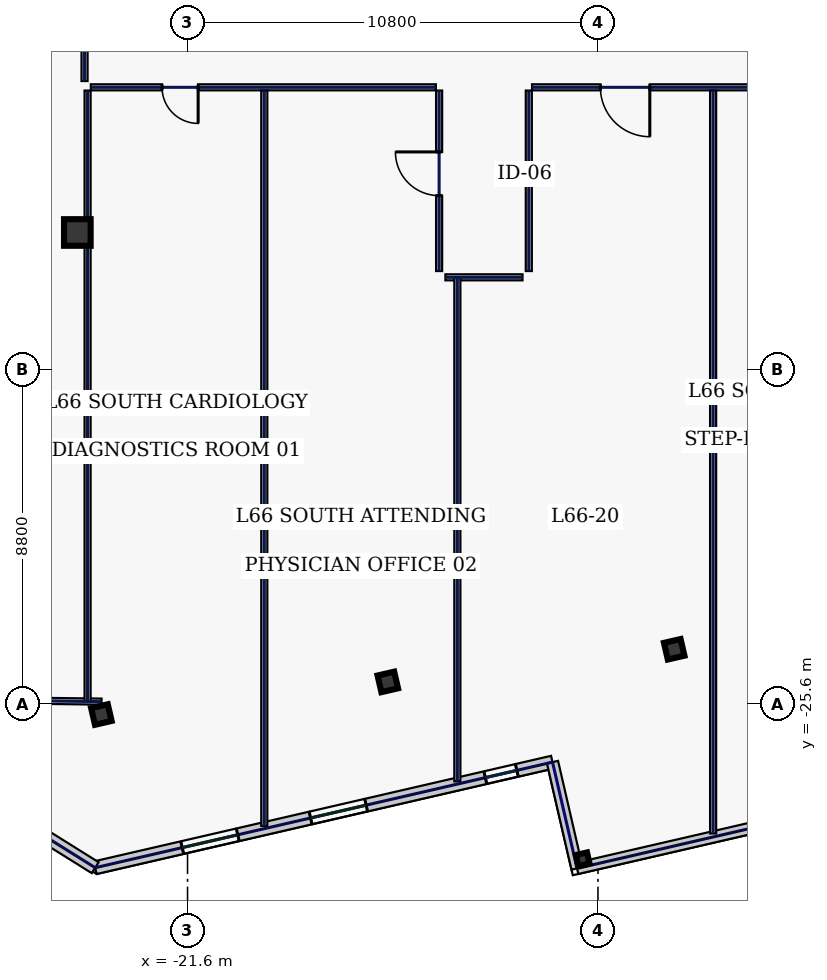
"""IFC4 building model, lengths in metres.
Left out: names, types, materials, properties, quantities, classifications, styles, units other than length and angle.
Written with IfcOpenShell. Run it as: python <this file> out.ifc"""

import sys

from ifc_helpers import new_model, si_unit, direction, frame, frame_2d, origin, origin_2d, place, context, subcontext, project, spatial, rectangle, hollow_rectangle, extrude, element, fill, save


model = new_model("IFC4")
c1 = context("Model", 3, precision=1e-05, world=origin(), true_north=direction((0.0, 1.0)))
c2 = subcontext(c1, "Body", "Model", "MODEL_VIEW")
j1 = project(units=[si_unit("LENGTHUNIT", "METRE"), si_unit("PLANEANGLEUNIT", "RADIAN")], contexts=[c1])
p1 = place(None, origin())
s1 = spatial("IfcSite", under=j1, at=p1, CompositionType="ELEMENT")
p2 = place(p1, origin())
s2 = spatial("IfcBuilding", under=s1, at=p2, CompositionType="ELEMENT")
p3 = place(p2, frame((0.0, 0.0, 285.0)))
s3 = spatial("IfcBuildingStorey", under=s2, at=p3, CompositionType="ELEMENT", Elevation=285.0)
p4 = place(p3, frame((-24.5, -13.2, 0.0), z_axis=(0.0, 0.0, 1.0), x_axis=(1.0, 0.0, 0.0)))
e1 = element("IfcColumn", 1, at=p4, inside=s3, PredefinedType="COLUMN", context=c2, shape_type="SweptSolid", body=[
    extrude(hollow_rectangle(XDim=0.7, YDim=0.7, WallThickness=0.032, at=origin_2d()), origin(), (0.0, 0.0, 1.0), 3.74),
])
for number, where, z_axis, x_axis in (
    (2, (-23.867, -25.886, 0.0), (0.0, 0.0, 1.0), (0.974, 0.225, 0.0)),
    (3, (-16.33, -25.027, 0.0), (0.0, 0.0, 1.0), (0.974, 0.225, 0.0)),
    (4, (-8.794, -24.168, 0.0), (0.0, 0.0, 1.0), (0.974, 0.225, 0.0)),
):
    element("IfcColumn", number, at=place(p3, frame(where, z_axis=z_axis, x_axis=x_axis)), inside=s3, PredefinedType="COLUMN", context=c2, shape_type="SweptSolid", body=[
        extrude(hollow_rectangle(XDim=0.45, YDim=0.45, WallThickness=0.022, at=origin_2d()), origin(), (0.0, 0.0, 1.0), 3.74),
    ])
p5 = place(p3, frame((-11.201, -29.695, 0.0), z_axis=(0.0, 0.0, 1.0), x_axis=(0.974370064785, 0.224951054344, 0.0)))
e5 = element("IfcColumn", 5, at=p5, inside=s3, PredefinedType="COLUMN", context=c2, shape_type="SweptSolid", body=[
    extrude(hollow_rectangle(XDim=0.3, YDim=0.3, WallThickness=0.016, at=origin_2d()), origin(), (0.0, 0.0, 1.0), 3.74),
])
p6 = place(p3, frame((-24.03, -29.916, 0.0), z_axis=(0.0, 0.0, 1.0), x_axis=(0.974371201193, 0.224946131964, 0.0)))
e6 = element("IfcWall", 6, at=p6, inside=s3, PredefinedType="STANDARD", context=c2, shape_type="SweptSolid", body=[
    extrude(rectangle(XDim=12.35, YDim=0.34, at=frame_2d((6.175, 0.0))), origin(), (0.0, 0.0, 1.0), 3.74),
])
p7 = place(p6, frame((2.35, 0.0, 0.9)))
e7 = element("IfcOpeningElement", 7, at=p7, cuts=e6, PredefinedType="OPENING", context=c2, shape_type="SweptSolid", body=[
    extrude(rectangle(XDim=1.5, YDim=2.0, at=frame_2d((0.75, 1.0))), frame((0.0, 0.18, 0.0), z_axis=(0.0, -1.0, 0.0), x_axis=(1.0, 0.0, 0.0)), (0.0, 0.0, 1.0), 0.36),
])
p8 = place(p6, frame((5.817, 0.0, 0.9)))
e8 = element("IfcOpeningElement", 8, at=p8, cuts=e6, PredefinedType="OPENING", context=c2, shape_type="SweptSolid", body=[
    extrude(rectangle(XDim=1.5, YDim=2.0, at=frame_2d((0.75, 1.0))), frame((0.0, 0.18, 0.0), z_axis=(0.0, -1.0, 0.0), x_axis=(1.0, 0.0, 0.0)), (0.0, 0.0, 1.0), 0.36),
])
p9 = place(p6, frame((10.537, 0.0, 0.9)))
e9 = element("IfcOpeningElement", 9, at=p9, cuts=e6, PredefinedType="OPENING", context=c2, shape_type="SweptSolid", body=[
    extrude(rectangle(XDim=0.85, YDim=1.85, at=frame_2d((0.425, 0.925))), frame((0.0, 0.18, 0.0), z_axis=(0.0, -1.0, 0.0), x_axis=(1.0, 0.0, 0.0)), (0.0, 0.0, 1.0), 0.36),
])
p10 = place(p3, frame((-29.343, -26.596, 0.0), z_axis=(0.0, 0.0, 1.0), x_axis=(0.848037708252, -0.529935887993, 0.0)))
e10 = element("IfcWall", 10, at=p10, inside=s3, PredefinedType="STANDARD", context=c2, shape_type="SweptSolid", body=[
    extrude(rectangle(XDim=6.265, YDim=0.34, at=frame_2d((3.133, 0.0))), origin(), (0.0, 0.0, 1.0), 3.74),
])
p11 = place(p3, frame((-11.996, -27.138, 0.0), z_axis=(0.0, 0.0, 1.0), x_axis=(0.224921635065, -0.974376856293, 0.0)))
e11 = element("IfcWall", 11, at=p11, inside=s3, PredefinedType="STANDARD", context=c2, shape_type="SweptSolid", body=[
    extrude(rectangle(XDim=2.87, YDim=0.3, at=frame_2d((1.435, 0.0))), origin(), (0.0, 0.0, 1.0), 3.74),
])
p12 = place(p3, frame((-11.351, -29.935, 0.0), z_axis=(0.0, 0.0, 1.0), x_axis=(0.974366807022, 0.224965164799, 0.0)))
e12 = element("IfcWall", 12, at=p12, inside=s3, PredefinedType="STANDARD", context=c2, shape_type="SweptSolid", body=[
    extrude(rectangle(XDim=8.1, YDim=0.3, at=frame_2d((4.05, 0.0))), origin(), (0.0, 0.0, 1.0), 3.385),
])
p13 = place(p3, frame((-28.994, -25.479, 0.0), z_axis=(0.0, 0.0, 1.0), x_axis=(0.999915052546, -0.01303409726, 0.0)))
e13 = element("IfcWall", 13, at=p13, inside=s3, PredefinedType="PARTITIONING", context=c2, shape_type="SweptSolid", body=[
    extrude(rectangle(XDim=5.132, YDim=0.16, at=frame_2d((2.566, 0.0))), origin(), (0.0, 0.0, 1.0), 3.74),
])
p14 = place(p3, frame((-24.31, -9.215, 0.0), z_axis=(0.0, 0.0, 1.0), x_axis=(0.0, 1.0, 0.0)))
e14 = element("IfcWall", 14, at=p14, inside=s3, PredefinedType="PARTITIONING", context=c2, shape_type="SweptSolid", body=[
    extrude(rectangle(XDim=18.63, YDim=0.16, at=frame_2d((9.315, 0.0))), origin(), (0.0, 0.0, 1.0), 3.74),
])
p15 = place(p14, frame((1.769, 0.0, 0.0)))
e15 = element("IfcOpeningElement", 15, at=p15, cuts=e14, PredefinedType="OPENING", context=c2, shape_type="SweptSolid", body=[
    extrude(rectangle(XDim=0.95, YDim=2.2, at=frame_2d((0.475, 1.1))), frame((0.0, 0.09, 0.0), z_axis=(0.0, -1.0, 0.0), x_axis=(1.0, 0.0, 0.0)), (0.0, 0.0, 1.0), 0.18),
])
p16 = place(p14, frame((5.6, 0.0, 0.0)))
e16 = element("IfcOpeningElement", 16, at=p16, cuts=e14, PredefinedType="OPENING", context=c2, shape_type="SweptSolid", body=[
    extrude(rectangle(XDim=0.95, YDim=2.2, at=frame_2d((0.475, 1.1))), frame((0.0, 0.09, 0.0), z_axis=(0.0, -1.0, 0.0), x_axis=(1.0, 0.0, 0.0)), (0.0, 0.0, 1.0), 0.18),
])
p17 = place(p14, frame((10.8, 0.0, 0.0)))
e17 = element("IfcOpeningElement", 17, at=p17, cuts=e14, PredefinedType="OPENING", context=c2, shape_type="SweptSolid", body=[
    extrude(rectangle(XDim=0.95, YDim=2.2, at=frame_2d((0.475, 1.1))), frame((0.0, 0.09, 0.0), z_axis=(0.0, -1.0, 0.0), x_axis=(1.0, 0.0, 0.0)), (0.0, 0.0, 1.0), 0.18),
])
p18 = place(p14, frame((15.981, 0.0, 0.0)))
e18 = element("IfcOpeningElement", 18, at=p18, cuts=e14, PredefinedType="OPENING", context=c2, shape_type="SweptSolid", body=[
    extrude(rectangle(XDim=0.95, YDim=2.2, at=frame_2d((0.475, 1.1))), frame((0.0, 0.09, 0.0), z_axis=(0.0, -1.0, 0.0), x_axis=(1.0, 0.0, 0.0)), (0.0, 0.0, 1.0), 0.18),
])
p19 = place(p3, frame((24.145, -9.38, 0.0), z_axis=(0.0, 0.0, 1.0), x_axis=(-1.0, 0.0, 0.0)))
e19 = element("IfcWall", 19, at=p19, inside=s3, PredefinedType="PARTITIONING", context=c2, shape_type="SweptSolid", body=[
    extrude(rectangle(XDim=36.68, YDim=0.16, at=frame_2d((18.34, 0.0))), origin(), (0.0, 0.0, 1.0), 3.74),
])
p20 = place(p19, frame((33.581, 0.0, 0.0)))
e20 = element("IfcOpeningElement", 20, at=p20, cuts=e19, PredefinedType="OPENING", context=c2, shape_type="SweptSolid", body=[
    extrude(rectangle(XDim=1.3, YDim=2.2, at=frame_2d((0.65, 1.1))), frame((0.0, 0.09, 0.0), z_axis=(0.0, -1.0, 0.0), x_axis=(1.0, 0.0, 0.0)), (0.0, 0.0, 1.0), 0.18),
])
p21 = place(p19, frame((28.946, 0.0, 0.0)))
e21 = element("IfcOpeningElement", 21, at=p21, cuts=e19, PredefinedType="OPENING", context=c2, shape_type="SweptSolid", body=[
    extrude(rectangle(XDim=1.3, YDim=2.2, at=frame_2d((0.65, 1.1))), frame((0.0, 0.09, 0.0), z_axis=(0.0, -1.0, 0.0), x_axis=(1.0, 0.0, 0.0)), (0.0, 0.0, 1.0), 0.18),
])
p22 = place(p19, frame((24.736, 0.0, 0.0)))
e22 = element("IfcOpeningElement", 22, at=p22, cuts=e19, PredefinedType="OPENING", context=c2, shape_type="SweptSolid", body=[
    extrude(rectangle(XDim=0.95, YDim=2.2, at=frame_2d((0.475, 1.1))), frame((0.0, 0.09, 0.0), z_axis=(0.0, -1.0, 0.0), x_axis=(1.0, 0.0, 0.0)), (0.0, 0.0, 1.0), 0.18),
])
p23 = place(p19, frame((18.455, 0.0, 0.0)))
e23 = element("IfcOpeningElement", 23, at=p23, cuts=e19, PredefinedType="OPENING", context=c2, shape_type="SweptSolid", body=[
    extrude(rectangle(XDim=0.95, YDim=2.2, at=frame_2d((0.475, 1.1))), frame((0.0, 0.09, 0.0), z_axis=(0.0, -1.0, 0.0), x_axis=(1.0, 0.0, 0.0)), (0.0, 0.0, 1.0), 0.18),
])
p24 = place(p19, frame((9.905, 0.0, 0.0)))
e24 = element("IfcOpeningElement", 24, at=p24, cuts=e19, PredefinedType="OPENING", context=c2, shape_type="SweptSolid", body=[
    extrude(rectangle(XDim=0.95, YDim=2.2, at=frame_2d((0.475, 1.1))), frame((0.0, 0.09, 0.0), z_axis=(0.0, -1.0, 0.0), x_axis=(1.0, 0.0, 0.0)), (0.0, 0.0, 1.0), 0.18),
])
p25 = place(p19, frame((2.784, 0.0, 0.0)))
e25 = element("IfcOpeningElement", 25, at=p25, cuts=e19, PredefinedType="OPENING", context=c2, shape_type="SweptSolid", body=[
    extrude(rectangle(XDim=1.05, YDim=2.2, at=frame_2d((0.525, 1.1))), frame((0.0, 0.09, 0.0), z_axis=(0.0, -1.0, 0.0), x_axis=(1.0, 0.0, 0.0)), (0.0, 0.0, 1.0), 0.18),
])
p26 = place(p3, frame((-12.62, -9.465, 0.0), z_axis=(0.0, 0.0, 1.0), x_axis=(0.0, -1.0, 0.0)))
e26 = element("IfcWall", 26, at=p26, inside=s3, PredefinedType="PARTITIONING", context=c2, shape_type="SweptSolid", body=[
    extrude(rectangle(XDim=4.75, YDim=0.16, at=frame_2d((2.375, 0.0))), origin(), (0.0, 0.0, 1.0), 3.74),
])
p27 = place(p3, frame((-12.785, -14.38, 0.0), z_axis=(0.0, 0.0, 1.0), x_axis=(-1.0, 0.0, 0.0)))
e27 = element("IfcWall", 27, at=p27, inside=s3, PredefinedType="PARTITIONING", context=c2, shape_type="SweptSolid", body=[
    extrude(rectangle(XDim=2.03, YDim=0.16, at=frame_2d((1.015, 0.0))), origin(), (0.0, 0.0, 1.0), 3.74),
])
p28 = place(p3, frame((-14.98, -14.215, 0.0), z_axis=(0.0, 0.0, 1.0), x_axis=(0.0, 1.0, 0.0)))
e28 = element("IfcWall", 28, at=p28, inside=s3, PredefinedType="PARTITIONING", context=c2, shape_type="SweptSolid", body=[
    extrude(rectangle(XDim=4.75, YDim=0.16, at=frame_2d((2.375, 0.0))), origin(), (0.0, 0.0, 1.0), 3.74),
])
p29 = place(p28, frame((1.985, 0.0, 0.0)))
e29 = element("IfcOpeningElement", 29, at=p29, cuts=e28, PredefinedType="OPENING", context=c2, shape_type="SweptSolid", body=[
    extrude(rectangle(XDim=1.15, YDim=2.2, at=frame_2d((0.575, 1.1))), frame((0.0, 0.09, 0.0), z_axis=(0.0, -1.0, 0.0), x_axis=(1.0, 0.0, 0.0)), (0.0, 0.0, 1.0), 0.18),
])
p30 = place(p3, frame((-15.065, -9.38, 0.0), z_axis=(0.0, 0.0, 1.0), x_axis=(-1.0, 0.0, 0.0)))
e30 = element("IfcWall", 30, at=p30, inside=s3, PredefinedType="PARTITIONING", context=c2, shape_type="SweptSolid", body=[
    extrude(rectangle(XDim=9.08, YDim=0.16, at=frame_2d((4.54, 0.0))), origin(), (0.0, 0.0, 1.0), 3.74),
])
p31 = place(p30, frame((6.256, 0.0, 0.0)))
e31 = element("IfcOpeningElement", 31, at=p31, cuts=e30, PredefinedType="OPENING", context=c2, shape_type="SweptSolid", body=[
    extrude(rectangle(XDim=0.95, YDim=2.2, at=frame_2d((0.475, 1.1))), frame((0.0, 0.09, 0.0), z_axis=(0.0, -1.0, 0.0), x_axis=(1.0, 0.0, 0.0)), (0.0, 0.0, 1.0), 0.18),
])
p32 = place(p3, frame((-24.23, -25.536, 0.0), z_axis=(0.0, 0.0, 1.0), x_axis=(0.0, 1.0, 0.0)))
e32 = element("IfcWall", 32, at=p32, inside=s3, PredefinedType="PARTITIONING", context=c2, shape_type="SweptSolid", body=[
    extrude(rectangle(XDim=16.071, YDim=0.16, at=frame_2d((8.035, 0.0))), origin(), (0.0, 0.0, 1.0), 3.335),
])
p33 = place(p3, frame((-19.58, -28.817, 0.0), z_axis=(0.0, 0.0, 1.0), x_axis=(0.0, 1.0, 0.0)))
e33 = element("IfcWall", 33, at=p33, inside=s3, PredefinedType="PARTITIONING", context=c2, shape_type="SweptSolid", body=[
    extrude(rectangle(XDim=19.352, YDim=0.16, at=frame_2d((9.676, 0.0))), origin(), (0.0, 0.0, 1.0), 3.74),
])
p34 = place(p3, frame((-14.5, -27.644, 0.0), z_axis=(0.0, 0.0, 1.0), x_axis=(0.0, 1.0, 0.0)))
e34 = element("IfcWall", 34, at=p34, inside=s3, PredefinedType="PARTITIONING", context=c2, shape_type="SweptSolid", body=[
    extrude(rectangle(XDim=13.259, YDim=0.16, at=frame_2d((6.63, 0.0))), origin(), (0.0, 0.0, 1.0), 3.74),
])
p35 = place(p3, frame((-7.77, -29.015, 0.0), z_axis=(0.0, 0.0, 1.0), x_axis=(0.0, 1.0, 0.0)))
e35 = element("IfcWall", 35, at=p35, inside=s3, PredefinedType="PARTITIONING", context=c2, shape_type="SweptSolid", body=[
    extrude(rectangle(XDim=19.55, YDim=0.16, at=frame_2d((9.775, 0.0))), origin(), (0.0, 0.0, 1.0), 3.74),
])
p36 = place(p7, origin())
e36 = element("IfcWindow", 36, at=p36, inside=s3, PartitioningType="SINGLE_PANEL", PredefinedType="WINDOW", context=c2, shape_type="SweptSolid", body=[
    extrude(rectangle(XDim=1.5, YDim=2.0, at=frame_2d((0.75, 1.0))), frame((0.0, 0.03, 0.0), z_axis=(0.0, -1.0, 0.0), x_axis=(1.0, 0.0, 0.0)), (0.0, 0.0, 1.0), 0.06),
])
fill(e7, e36)
p37 = place(p8, origin())
e37 = element("IfcWindow", 37, at=p37, inside=s3, PartitioningType="SINGLE_PANEL", PredefinedType="WINDOW", context=c2, shape_type="SweptSolid", body=[
    extrude(rectangle(XDim=1.5, YDim=2.0, at=frame_2d((0.75, 1.0))), frame((0.0, 0.03, 0.0), z_axis=(0.0, -1.0, 0.0), x_axis=(1.0, 0.0, 0.0)), (0.0, 0.0, 1.0), 0.06),
])
fill(e8, e37)
p38 = place(p9, origin())
e38 = element("IfcWindow", 38, at=p38, inside=s3, PartitioningType="SINGLE_PANEL", PredefinedType="WINDOW", context=c2, shape_type="SweptSolid", body=[
    extrude(rectangle(XDim=0.85, YDim=1.85, at=frame_2d((0.425, 0.925))), frame((0.0, 0.03, 0.0), z_axis=(0.0, -1.0, 0.0), x_axis=(1.0, 0.0, 0.0)), (0.0, 0.0, 1.0), 0.06),
])
fill(e9, e38)
p39 = place(p31, origin())
e39 = element("IfcDoor", 39, at=p39, inside=s3, OperationType="SINGLE_SWING_LEFT", PredefinedType="DOOR", context=c2, shape_type="SweptSolid", body=[
    extrude(rectangle(XDim=0.95, YDim=2.2, at=frame_2d((0.475, 1.1))), frame((0.0, 0.025, 0.0), z_axis=(0.0, -1.0, 0.0), x_axis=(1.0, 0.0, 0.0)), (0.0, 0.0, 1.0), 0.05),
])
fill(e31, e39)
p40 = place(p29, origin())
e40 = element("IfcDoor", 40, at=p40, inside=s3, OperationType="SINGLE_SWING_RIGHT", PredefinedType="DOOR", context=c2, shape_type="SweptSolid", body=[
    extrude(rectangle(XDim=1.15, YDim=2.2, at=frame_2d((0.575, 1.1))), frame((0.0, 0.025, 0.0), z_axis=(0.0, -1.0, 0.0), x_axis=(1.0, 0.0, 0.0)), (0.0, 0.0, 1.0), 0.05),
])
fill(e29, e40)
p41 = place(p20, origin())
e41 = element("IfcDoor", 41, at=p41, inside=s3, OperationType="SINGLE_SWING_LEFT", PredefinedType="DOOR", context=c2, shape_type="SweptSolid", body=[
    extrude(rectangle(XDim=1.3, YDim=2.2, at=frame_2d((0.65, 1.1))), frame((0.0, 0.025, 0.0), z_axis=(0.0, -1.0, 0.0), x_axis=(1.0, 0.0, 0.0)), (0.0, 0.0, 1.0), 0.05),
])
fill(e20, e41)
save(model, sys.argv[1])
